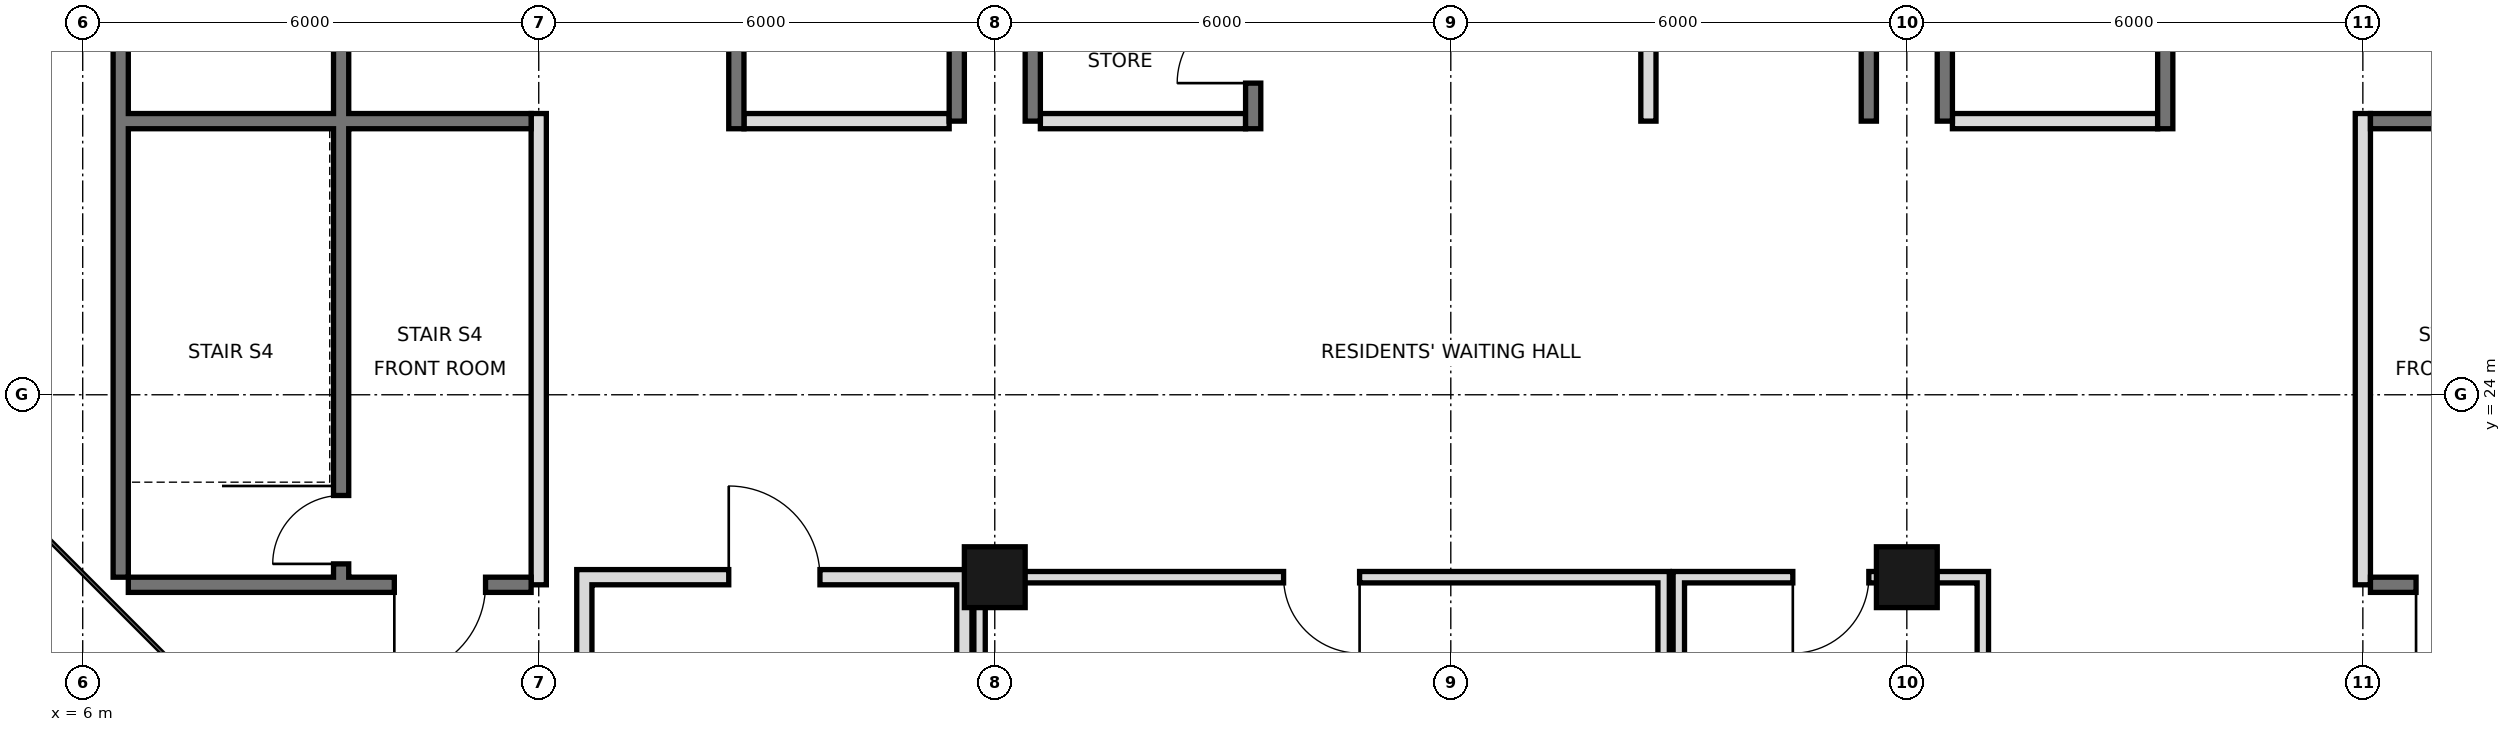
"""IFC4 building model, lengths in metres.
Left out: names, types, materials, properties, quantities, classifications, styles, units other than length and angle.
Written with IfcOpenShell. Run it as: python <this file> out.ifc"""

import sys

from ifc_helpers import new_model, si_unit, direction, frame, frame_2d, origin, origin_2d, place, context, subcontext, project, spatial, rectangle, hollow_rectangle, extrude, element, fill, save


model = new_model("IFC4")
c1 = context("Model", 3, precision=1e-05, world=origin(), true_north=direction((0.0, 1.0)))
c2 = subcontext(c1, "Body", "Model", "MODEL_VIEW")
j1 = project(units=[si_unit("LENGTHUNIT", "METRE"), si_unit("PLANEANGLEUNIT", "RADIAN")], contexts=[c1])
p1 = place(None, origin())
s1 = spatial("IfcSite", under=j1, at=p1, CompositionType="ELEMENT")
p2 = place(p1, origin())
s2 = spatial("IfcBuilding", under=s1, at=p2, CompositionType="ELEMENT")
p3 = place(p2, frame((0.0, 0.0, 353.8)))
s3 = spatial("IfcBuildingStorey", under=s2, at=p3, CompositionType="ELEMENT", Elevation=353.8)
for number, where, z_axis, x_axis in (
    (1, (18.0, 21.6, 0.0), (0.0, 0.0, 1.0), (1.0, 0.0, 0.0)),
    (2, (30.0, 21.6, 0.0), (0.0, 0.0, 1.0), (1.0, 0.0, 0.0)),
):
    element("IfcColumn", number, at=place(p3, frame(where, z_axis=z_axis, x_axis=x_axis)), inside=s3, PredefinedType="COLUMN", context=c2, shape_type="SweptSolid", body=[
        extrude(hollow_rectangle(XDim=0.8, YDim=0.8, WallThickness=0.025, at=origin_2d()), origin(), (0.0, 0.0, 1.0), 3.75),
    ])
for number, where, z_axis, x_axis in (
    (3, (12.6, 17.5, 0.0), (0.0, 0.0, 1.0), (0.0, 1.0, 0.0)),
    (4, (17.6, 17.5, 0.0), (0.0, 0.0, 1.0), (0.0, 1.0, 0.0)),
):
    element("IfcWall", number, at=place(p3, frame(where, z_axis=z_axis, x_axis=x_axis)), inside=s3, PredefinedType="SOLIDWALL", context=c2, shape_type="SweptSolid", body=[
        extrude(rectangle(XDim=4.2, YDim=0.2, at=frame_2d((2.1, 0.0))), origin(), (0.0, 0.0, 1.0), 3.75),
    ])
p4 = place(p3, frame((17.8, 17.525, 0.0), z_axis=(0.0, 0.0, 1.0), x_axis=(0.0, 1.0, 0.0)))
e5 = element("IfcWall", 5, at=p4, inside=s3, PredefinedType="PARTITIONING", context=c2, shape_type="SweptSolid", body=[
    extrude(rectangle(XDim=4.15, YDim=0.15, at=frame_2d((2.075, 0.0))), origin(), (0.0, 0.0, 1.0), 3.15),
])
for number, where, z_axis, x_axis in (
    (6, (26.8, 17.525, 0.0), (0.0, 0.0, 1.0), (0.0, 1.0, 0.0)),
    (7, (27.0, 17.525, 0.0), (0.0, 0.0, 1.0), (0.0, 1.0, 0.0)),
    (8, (31.0, 17.525, 0.0), (0.0, 0.0, 1.0), (0.0, 1.0, 0.0)),
):
    element("IfcWall", number, at=place(p3, frame(where, z_axis=z_axis, x_axis=x_axis)), inside=s3, PredefinedType="PARTITIONING", context=c2, shape_type="SweptSolid", body=[
        extrude(rectangle(XDim=4.15, YDim=0.15, at=frame_2d((2.075, 0.0))), origin(), (0.0, 0.0, 1.0), 3.75),
    ])
p5 = place(p3, frame((12.7, 21.6, 0.0), z_axis=(0.0, 0.0, 1.0), x_axis=(1.0, 0.0, 0.0)))
e9 = element("IfcWall", 9, at=p5, inside=s3, PredefinedType="SOLIDWALL", context=c2, shape_type="SweptSolid", body=[
    extrude(rectangle(XDim=4.8, YDim=0.2, at=frame_2d((2.4, 0.0))), origin(), (0.0, 0.0, 1.0), 3.75),
])
p6 = place(p5, frame((1.8, 0.0, 0.0)))
e10 = element("IfcOpeningElement", 10, at=p6, cuts=e9, PredefinedType="OPENING", context=c2, shape_type="SweptSolid", body=[
    extrude(rectangle(XDim=1.2, YDim=2.4, at=frame_2d((0.6, 1.2))), frame((0.0, 0.11, 0.0), z_axis=(0.0, -1.0, 0.0), x_axis=(1.0, 0.0, 0.0)), (0.0, 0.0, 1.0), 0.22),
])
p7 = place(p3, frame((17.875, 21.6, 0.0), z_axis=(0.0, 0.0, 1.0), x_axis=(1.0, 0.0, 0.0)))
e11 = element("IfcWall", 11, at=p7, inside=s3, PredefinedType="PARTITIONING", context=c2, shape_type="SweptSolid", body=[
    extrude(rectangle(XDim=8.85, YDim=0.15, at=frame_2d((4.425, 0.0))), origin(), (0.0, 0.0, 1.0), 3.75),
])
p8 = place(p7, frame((3.925, 0.0, 0.0)))
e12 = element("IfcOpeningElement", 12, at=p8, cuts=e11, PredefinedType="OPENING", context=c2, shape_type="SweptSolid", body=[
    extrude(rectangle(XDim=1.0, YDim=2.4, at=frame_2d((0.5, 1.2))), frame((0.0, 0.085, 0.0), z_axis=(0.0, -1.0, 0.0), x_axis=(1.0, 0.0, 0.0)), (0.0, 0.0, 1.0), 0.17),
])
p9 = place(p3, frame((27.075, 21.6, 0.0), z_axis=(0.0, 0.0, 1.0), x_axis=(1.0, 0.0, 0.0)))
e13 = element("IfcWall", 13, at=p9, inside=s3, PredefinedType="PARTITIONING", context=c2, shape_type="SweptSolid", body=[
    extrude(rectangle(XDim=3.85, YDim=0.15, at=frame_2d((1.925, 0.0))), origin(), (0.0, 0.0, 1.0), 3.75),
])
p10 = place(p9, frame((1.425, 0.0, 0.0)))
e14 = element("IfcOpeningElement", 14, at=p10, cuts=e13, PredefinedType="OPENING", context=c2, shape_type="SweptSolid", body=[
    extrude(rectangle(XDim=1.0, YDim=2.4, at=frame_2d((0.5, 1.2))), frame((0.0, 0.085, 0.0), z_axis=(0.0, -1.0, 0.0), x_axis=(1.0, 0.0, 0.0)), (0.0, 0.0, 1.0), 0.17),
])
p11 = place(p3, frame((6.5, 21.6, 0.0), z_axis=(0.0, 0.0, 1.0), x_axis=(0.0, 1.0, 0.0)))
e15 = element("IfcWall", 15, at=p11, inside=s3, PredefinedType="SOLIDWALL", context=c2, shape_type="SweptSolid", body=[
    extrude(rectangle(XDim=23.5, YDim=0.2, at=frame_2d((11.75, 0.0))), origin(), (0.0, 0.0, 1.0), 3.75),
])
for number, where, z_axis, x_axis in (
    (16, (17.5, 27.6, 0.0), (0.0, 0.0, 1.0), (0.0, 1.0, 0.0)),
    (17, (18.5, 27.6, 0.0), (0.0, 0.0, 1.0), (0.0, 1.0, 0.0)),
    (18, (29.5, 27.6, 0.0), (0.0, 0.0, 1.0), (0.0, 1.0, 0.0)),
    (19, (30.5, 27.6, 0.0), (0.0, 0.0, 1.0), (0.0, 1.0, 0.0)),
):
    element("IfcWall", number, at=place(p3, frame(where, z_axis=z_axis, x_axis=x_axis)), inside=s3, PredefinedType="SOLIDWALL", context=c2, shape_type="SweptSolid", body=[
        extrude(rectangle(XDim=17.5, YDim=0.2, at=frame_2d((8.75, 0.0))), origin(), (0.0, 0.0, 1.0), 3.75),
    ])
p12 = place(p3, frame((12.0, 21.5, 0.0), z_axis=(0.0, 0.0, 1.0), x_axis=(0.0, 1.0, 0.0)))
e20 = element("IfcWall", 20, at=p12, inside=s3, PredefinedType="PARTITIONING", context=c2, shape_type="SweptSolid", body=[
    extrude(rectangle(XDim=6.2, YDim=0.2, at=frame_2d((3.1, 0.0))), origin(), (0.0, 0.0, 1.0), 3.75),
])
p13 = place(p3, frame((14.6, 27.5, 0.0), z_axis=(0.0, 0.0, 1.0), x_axis=(0.0, 1.0, 0.0)))
e21 = element("IfcWall", 21, at=p13, inside=s3, PredefinedType="SOLIDWALL", context=c2, shape_type="SweptSolid", body=[
    extrude(rectangle(XDim=17.5, YDim=0.2, at=frame_2d((8.75, 0.0))), origin(), (0.0, 0.0, 1.0), 3.75),
])
p14 = place(p13, frame((15.4, 0.0, 0.0)))
e22 = element("IfcOpeningElement", 22, at=p14, cuts=e21, PredefinedType="OPENING", context=c2, shape_type="SweptSolid", body=[
    extrude(rectangle(XDim=1.1, YDim=2.1, at=frame_2d((0.55, 1.05))), frame((0.0, 0.11, 0.0), z_axis=(0.0, -1.0, 0.0), x_axis=(1.0, 0.0, 0.0)), (0.0, 0.0, 1.0), 0.22),
])
p15 = place(p13, frame((2.7, 0.0, 0.0)))
e23 = element("IfcOpeningElement", 23, at=p15, cuts=e21, PredefinedType="OPENING", context=c2, shape_type="SweptSolid", body=[
    extrude(rectangle(XDim=1.0, YDim=2.1, at=frame_2d((0.5, 1.05))), frame((0.0, 0.11, 0.0), z_axis=(0.0, -1.0, 0.0), x_axis=(1.0, 0.0, 0.0)), (0.0, 0.0, 1.0), 0.22),
])
p16 = place(p3, frame((21.4, 27.5, 0.0), z_axis=(0.0, 0.0, 1.0), x_axis=(0.0, 1.0, 0.0)))
e24 = element("IfcWall", 24, at=p16, inside=s3, PredefinedType="SOLIDWALL", context=c2, shape_type="SweptSolid", body=[
    extrude(rectangle(XDim=17.5, YDim=0.2, at=frame_2d((8.75, 0.0))), origin(), (0.0, 0.0, 1.0), 3.75),
])
p17 = place(p16, frame((0.6, 0.0, 0.0)))
e25 = element("IfcOpeningElement", 25, at=p17, cuts=e24, PredefinedType="OPENING", context=c2, shape_type="SweptSolid", body=[
    extrude(rectangle(XDim=1.0, YDim=2.1, at=frame_2d((0.5, 1.05))), frame((0.0, 0.11, 0.0), z_axis=(0.0, -1.0, 0.0), x_axis=(1.0, 0.0, 0.0)), (0.0, 0.0, 1.0), 0.22),
])
p18 = place(p16, frame((3.7, 0.0, 0.0)))
e26 = element("IfcOpeningElement", 26, at=p18, cuts=e24, PredefinedType="OPENING", context=c2, shape_type="SweptSolid", body=[
    extrude(rectangle(XDim=1.0, YDim=2.1, at=frame_2d((0.5, 1.05))), frame((0.0, 0.11, 0.0), z_axis=(0.0, -1.0, 0.0), x_axis=(1.0, 0.0, 0.0)), (0.0, 0.0, 1.0), 0.22),
])
p19 = place(p16, frame((9.8, 0.0, 0.0)))
e27 = element("IfcOpeningElement", 27, at=p19, cuts=e24, PredefinedType="OPENING", context=c2, shape_type="SweptSolid", body=[
    extrude(rectangle(XDim=1.0, YDim=2.1, at=frame_2d((0.5, 1.05))), frame((0.0, 0.11, 0.0), z_axis=(0.0, -1.0, 0.0), x_axis=(1.0, 0.0, 0.0)), (0.0, 0.0, 1.0), 0.22),
])
p20 = place(p3, frame((26.6, 27.6, 0.0), z_axis=(0.0, 0.0, 1.0), x_axis=(0.0, 1.0, 0.0)))
e28 = element("IfcWall", 28, at=p20, inside=s3, PredefinedType="PARTITIONING", context=c2, shape_type="SweptSolid", body=[
    extrude(rectangle(XDim=17.4, YDim=0.2, at=frame_2d((8.7, 0.0))), origin(), (0.0, 0.0, 1.0), 3.75),
])
p21 = place(p20, frame((10.25, 0.0, 0.0)))
e29 = element("IfcOpeningElement", 29, at=p21, cuts=e28, PredefinedType="OPENING", context=c2, shape_type="SweptSolid", body=[
    extrude(rectangle(XDim=1.0, YDim=2.1, at=frame_2d((0.5, 1.05))), frame((0.0, 0.11, 0.0), z_axis=(0.0, -1.0, 0.0), x_axis=(1.0, 0.0, 0.0)), (0.0, 0.0, 1.0), 0.22),
])
p22 = place(p20, frame((14.475, 0.0, 0.0)))
e30 = element("IfcOpeningElement", 30, at=p22, cuts=e28, PredefinedType="OPENING", context=c2, shape_type="SweptSolid", body=[
    extrude(rectangle(XDim=1.0, YDim=2.1, at=frame_2d((0.5, 1.05))), frame((0.0, 0.11, 0.0), z_axis=(0.0, -1.0, 0.0), x_axis=(1.0, 0.0, 0.0)), (0.0, 0.0, 1.0), 0.22),
])
p23 = place(p3, frame((33.4, 27.5, 0.0), z_axis=(0.0, 0.0, 1.0), x_axis=(0.0, 1.0, 0.0)))
e31 = element("IfcWall", 31, at=p23, inside=s3, PredefinedType="SOLIDWALL", context=c2, shape_type="SweptSolid", body=[
    extrude(rectangle(XDim=17.5, YDim=0.2, at=frame_2d((8.75, 0.0))), origin(), (0.0, 0.0, 1.0), 3.75),
])
p24 = place(p23, frame((15.4, 0.0, 0.0)))
e32 = element("IfcOpeningElement", 32, at=p24, cuts=e31, PredefinedType="OPENING", context=c2, shape_type="SweptSolid", body=[
    extrude(rectangle(XDim=1.1, YDim=2.1, at=frame_2d((0.55, 1.05))), frame((0.0, 0.11, 0.0), z_axis=(0.0, -1.0, 0.0), x_axis=(1.0, 0.0, 0.0)), (0.0, 0.0, 1.0), 0.22),
])
p25 = place(p23, frame((2.7, 0.0, 0.0)))
e33 = element("IfcOpeningElement", 33, at=p25, cuts=e31, PredefinedType="OPENING", context=c2, shape_type="SweptSolid", body=[
    extrude(rectangle(XDim=1.0, YDim=2.1, at=frame_2d((0.5, 1.05))), frame((0.0, 0.11, 0.0), z_axis=(0.0, -1.0, 0.0), x_axis=(1.0, 0.0, 0.0)), (0.0, 0.0, 1.0), 0.22),
])
p26 = place(p3, frame((36.0, 21.5, 0.0), z_axis=(0.0, 0.0, 1.0), x_axis=(0.0, 1.0, 0.0)))
e34 = element("IfcWall", 34, at=p26, inside=s3, PredefinedType="PARTITIONING", context=c2, shape_type="SweptSolid", body=[
    extrude(rectangle(XDim=6.2, YDim=0.2, at=frame_2d((3.1, 0.0))), origin(), (0.0, 0.0, 1.0), 3.75),
])
p27 = place(p3, frame((9.4, 21.5, 0.0), z_axis=(0.0, 0.0, 1.0), x_axis=(0.0, 1.0, 0.0)))
e35 = element("IfcWall", 35, at=p27, inside=s3, PredefinedType="SOLIDWALL", context=c2, shape_type="SweptSolid", body=[
    extrude(rectangle(XDim=23.5, YDim=0.2, at=frame_2d((11.75, 0.0))), origin(), (0.0, 0.0, 1.0), 3.75),
])
p28 = place(p27, frame((8.05, 0.0, 0.0)))
e36 = element("IfcOpeningElement", 36, at=p28, cuts=e35, PredefinedType="OPENING", context=c2, shape_type="SweptSolid", body=[
    extrude(rectangle(XDim=1.0, YDim=2.1, at=frame_2d((0.5, 1.05))), frame((0.0, 0.11, 0.0), z_axis=(0.0, -1.0, 0.0), x_axis=(1.0, 0.0, 0.0)), (0.0, 0.0, 1.0), 0.22),
])
p29 = place(p27, frame((12.7, 0.0, 0.0)))
e37 = element("IfcOpeningElement", 37, at=p29, cuts=e35, PredefinedType="OPENING", context=c2, shape_type="SweptSolid", body=[
    extrude(rectangle(XDim=1.0, YDim=2.1, at=frame_2d((0.5, 1.05))), frame((0.0, 0.11, 0.0), z_axis=(0.0, -1.0, 0.0), x_axis=(1.0, 0.0, 0.0)), (0.0, 0.0, 1.0), 0.22),
])
p30 = place(p27, frame((15.8, 0.0, 0.0)))
e38 = element("IfcOpeningElement", 38, at=p30, cuts=e35, PredefinedType="OPENING", context=c2, shape_type="SweptSolid", body=[
    extrude(rectangle(XDim=1.0, YDim=2.1, at=frame_2d((0.5, 1.05))), frame((0.0, 0.11, 0.0), z_axis=(0.0, -1.0, 0.0), x_axis=(1.0, 0.0, 0.0)), (0.0, 0.0, 1.0), 0.22),
])
p31 = place(p27, frame((0.275, 0.0, 0.0)))
e39 = element("IfcOpeningElement", 39, at=p31, cuts=e35, PredefinedType="OPENING", context=c2, shape_type="SweptSolid", body=[
    extrude(rectangle(XDim=0.9, YDim=2.1, at=frame_2d((0.45, 1.05))), frame((0.0, 0.11, 0.0), z_axis=(0.0, -1.0, 0.0), x_axis=(1.0, 0.0, 0.0)), (0.0, 0.0, 1.0), 0.22),
])
p32 = place(p3, frame((36.1, 21.5, 0.0), z_axis=(0.0, 0.0, 1.0), x_axis=(1.0, 0.0, 0.0)))
e40 = element("IfcWall", 40, at=p32, inside=s3, PredefinedType="SOLIDWALL", context=c2, shape_type="SweptSolid", body=[
    extrude(rectangle(XDim=5.3, YDim=0.2, at=frame_2d((2.65, 0.0))), origin(), (0.0, 0.0, 1.0), 3.75),
])
p33 = place(p32, frame((0.6, 0.0, 0.0)))
e41 = element("IfcOpeningElement", 41, at=p33, cuts=e40, PredefinedType="OPENING", context=c2, shape_type="SweptSolid", body=[
    extrude(rectangle(XDim=1.2, YDim=2.1, at=frame_2d((0.6, 1.05))), frame((0.0, 0.11, 0.0), z_axis=(0.0, -1.0, 0.0), x_axis=(1.0, 0.0, 0.0)), (0.0, 0.0, 1.0), 0.22),
])
p34 = place(p3, frame((6.6, 21.5, 0.0), z_axis=(0.0, 0.0, 1.0), x_axis=(1.0, 0.0, 0.0)))
e42 = element("IfcWall", 42, at=p34, inside=s3, PredefinedType="SOLIDWALL", context=c2, shape_type="SweptSolid", body=[
    extrude(rectangle(XDim=5.3, YDim=0.2, at=frame_2d((2.65, 0.0))), origin(), (0.0, 0.0, 1.0), 3.75),
])
p35 = place(p34, frame((3.5, 0.0, 0.0)))
e43 = element("IfcOpeningElement", 43, at=p35, cuts=e42, PredefinedType="OPENING", context=c2, shape_type="SweptSolid", body=[
    extrude(rectangle(XDim=1.2, YDim=2.1, at=frame_2d((0.6, 1.05))), frame((0.0, 0.11, 0.0), z_axis=(0.0, -1.0, 0.0), x_axis=(1.0, 0.0, 0.0)), (0.0, 0.0, 1.0), 0.22),
])
for number, where, z_axis, x_axis in (
    (44, (14.7, 27.6, 0.0), (0.0, 0.0, 1.0), (1.0, 0.0, 0.0)),
    (45, (18.6, 27.6, 0.0), (0.0, 0.0, 1.0), (1.0, 0.0, 0.0)),
    (46, (30.6, 27.6, 0.0), (0.0, 0.0, 1.0), (1.0, 0.0, 0.0)),
):
    element("IfcWall", number, at=place(p3, frame(where, z_axis=z_axis, x_axis=x_axis)), inside=s3, PredefinedType="PARTITIONING", context=c2, shape_type="SweptSolid", body=[
        extrude(rectangle(XDim=2.7, YDim=0.2, at=frame_2d((1.35, 0.0))), origin(), (0.0, 0.0, 1.0), 3.75),
    ])
for number, where, z_axis, x_axis in (
    (47, (36.1, 27.6, 0.0), (0.0, 0.0, 1.0), (1.0, 0.0, 0.0)),
    (48, (6.6, 27.6, 0.0), (0.0, 0.0, 1.0), (1.0, 0.0, 0.0)),
):
    element("IfcWall", number, at=place(p3, frame(where, z_axis=z_axis, x_axis=x_axis)), inside=s3, PredefinedType="SOLIDWALL", context=c2, shape_type="SweptSolid", body=[
        extrude(rectangle(XDim=5.3, YDim=0.2, at=frame_2d((2.65, 0.0))), origin(), (0.0, 0.0, 1.0), 3.75),
    ])
p36 = place(p6, origin())
e49 = element("IfcDoor", 49, at=p36, inside=s3, OperationType="SINGLE_SWING_LEFT", PredefinedType="DOOR", context=c2, shape_type="SweptSolid", body=[
    extrude(rectangle(XDim=1.2, YDim=2.4, at=frame_2d((0.6, 1.2))), frame((0.0, 0.025, 0.0), z_axis=(0.0, -1.0, 0.0), x_axis=(1.0, 0.0, 0.0)), (0.0, 0.0, 1.0), 0.05),
])
fill(e10, e49)
p37 = place(p8, origin())
e50 = element("IfcDoor", 50, at=p37, inside=s3, OperationType="SINGLE_SWING_RIGHT", PredefinedType="DOOR", context=c2, shape_type="SweptSolid", body=[
    extrude(rectangle(XDim=1.0, YDim=2.4, at=frame_2d((0.5, 1.2))), frame((0.0, 0.025, 0.0), z_axis=(0.0, -1.0, 0.0), x_axis=(1.0, 0.0, 0.0)), (0.0, 0.0, 1.0), 0.05),
])
fill(e12, e50)
p38 = place(p10, frame((1.0, 0.0, 0.0), z_axis=(0.0, 0.0, 1.0), x_axis=(-1.0, 0.0, 0.0)))
e51 = element("IfcDoor", 51, at=p38, inside=s3, OperationType="SINGLE_SWING_RIGHT", PredefinedType="DOOR", context=c2, shape_type="SweptSolid", body=[
    extrude(rectangle(XDim=1.0, YDim=2.4, at=frame_2d((0.5, 1.2))), frame((0.0, 0.025, 0.0), z_axis=(0.0, -1.0, 0.0), x_axis=(1.0, 0.0, 0.0)), (0.0, 0.0, 1.0), 0.05),
])
fill(e14, e51)
p39 = place(p35, frame((1.2, 0.0, 0.0), z_axis=(0.0, 0.0, 1.0), x_axis=(-1.0, 0.0, 0.0)))
e52 = element("IfcDoor", 52, at=p39, inside=s3, OperationType="SINGLE_SWING_RIGHT", PredefinedType="DOOR", context=c2, shape_type="SweptSolid", body=[
    extrude(rectangle(XDim=1.2, YDim=2.1, at=frame_2d((0.6, 1.05))), frame((0.0, 0.025, 0.0), z_axis=(0.0, -1.0, 0.0), x_axis=(1.0, 0.0, 0.0)), (0.0, 0.0, 1.0), 0.05),
])
fill(e43, e52)
p40 = place(p33, frame((1.2, 0.0, 0.0), z_axis=(0.0, 0.0, 1.0), x_axis=(-1.0, 0.0, 0.0)))
e53 = element("IfcDoor", 53, at=p40, inside=s3, OperationType="SINGLE_SWING_RIGHT", PredefinedType="DOOR", context=c2, shape_type="SweptSolid", body=[
    extrude(rectangle(XDim=1.2, YDim=2.1, at=frame_2d((0.6, 1.05))), frame((0.0, 0.025, 0.0), z_axis=(0.0, -1.0, 0.0), x_axis=(1.0, 0.0, 0.0)), (0.0, 0.0, 1.0), 0.05),
])
fill(e41, e53)
p41 = place(p17, origin())
e54 = element("IfcDoor", 54, at=p41, inside=s3, OperationType="SINGLE_SWING_LEFT", PredefinedType="DOOR", context=c2, shape_type="SweptSolid", body=[
    extrude(rectangle(XDim=1.0, YDim=2.1, at=frame_2d((0.5, 1.05))), frame((0.0, 0.025, 0.0), z_axis=(0.0, -1.0, 0.0), x_axis=(1.0, 0.0, 0.0)), (0.0, 0.0, 1.0), 0.05),
])
fill(e25, e54)
p42 = place(p31, origin())
e55 = element("IfcDoor", 55, at=p42, inside=s3, OperationType="SINGLE_SWING_LEFT", PredefinedType="DOOR", context=c2, shape_type="SweptSolid", body=[
    extrude(rectangle(XDim=0.9, YDim=2.1, at=frame_2d((0.45, 1.05))), frame((0.0, 0.025, 0.0), z_axis=(0.0, -1.0, 0.0), x_axis=(1.0, 0.0, 0.0)), (0.0, 0.0, 1.0), 0.05),
])
fill(e39, e55)
save(model, sys.argv[1])
